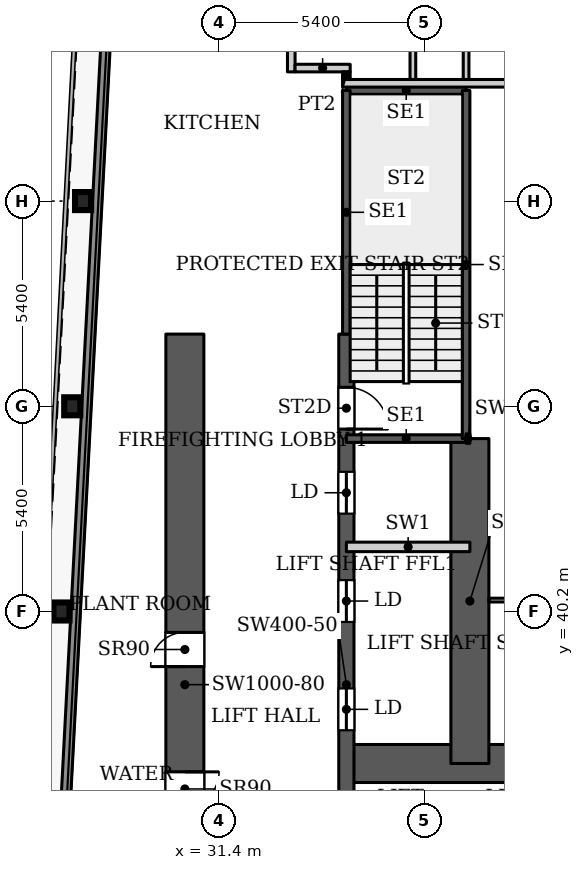
"""IFC4 building model, lengths in metres.
Left out: names, types, materials, properties, quantities, classifications, styles, units other than length and angle.
Written with IfcOpenShell. Run it as: python <this file> out.ifc"""

import sys

from ifc_helpers import new_model, si_unit, direction, frame, frame_2d, origin, origin_2d, place, context, subcontext, project, spatial, rectangle, i_section, extrude, source, transform, mapped, element, fill, save


model = new_model("IFC4")
c1 = context("Model", 3, precision=1e-05, world=origin(), true_north=direction((0.0, 1.0)))
c2 = subcontext(c1, "Body", "Model", "MODEL_VIEW")
j1 = project(units=[si_unit("LENGTHUNIT", "METRE"), si_unit("PLANEANGLEUNIT", "RADIAN")], contexts=[c1])
p1 = place(None, origin())
s1 = spatial("IfcSite", under=j1, at=p1, CompositionType="ELEMENT")
p2 = place(p1, origin())
s2 = spatial("IfcBuilding", under=s1, at=p2, CompositionType="ELEMENT")
p3 = place(p2, frame((0.0, 0.0, 57.8)))
s3 = spatial("IfcBuildingStorey", under=s2, at=p3, CompositionType="ELEMENT", Elevation=57.8)
for number, where, z_axis, x_axis in (
    (1, (27.253, 40.2, 0.0), (0.0, 0.0, 1.0), (1.0, 0.0, 0.0)),
    (2, (27.537, 45.6, 0.0), (0.0, 0.0, 1.0), (1.0, 0.0, 0.0)),
    (3, (27.822, 51.0, 0.0), (0.0, 0.0, 1.0), (1.0, 0.0, 0.0)),
):
    element("IfcColumn", number, at=place(p3, frame(where, z_axis=z_axis, x_axis=x_axis)), inside=s3, PredefinedType="COLUMN", context=c2, shape_type="SweptSolid", body=[
        extrude(i_section(OverallWidth=0.424, OverallDepth=0.474, WebThickness=0.048, FlangeThickness=0.077, FilletRadius=0.014, at=origin_2d()), origin(), (0.0, 0.0, 1.0), 3.9),
    ])
p4 = place(p3, frame((34.75, 36.2, 0.0), z_axis=(0.0, 0.0, 1.0), x_axis=(1.0, 0.0, 0.0)))
e4 = element("IfcWall", 4, at=p4, inside=s3, PredefinedType="SHEAR", context=c2, shape_type="SweptSolid", body=[
    extrude(rectangle(XDim=18.4, YDim=1.0, at=frame_2d((9.2, 0.0))), origin(), (0.0, 0.0, 1.0), 3.9),
])
p5 = place(p4, frame((16.9, 0.0, 0.0)))
e5 = element("IfcOpeningElement", 5, at=p5, cuts=e4, PredefinedType="OPENING", context=c2, shape_type="SweptSolid", body=[
    extrude(rectangle(XDim=1.0, YDim=2.2, at=frame_2d((0.5, 1.1))), frame((0.0, 0.51, 0.0), z_axis=(0.0, -1.0, 0.0), x_axis=(1.0, 0.0, 0.0)), (0.0, 0.0, 1.0), 1.02),
])
p6 = place(p3, frame((34.75, 29.05, 0.0), z_axis=(0.0, 0.0, 1.0), x_axis=(0.0, 1.0, 0.0)))
e6 = element("IfcWall", 6, at=p6, inside=s3, PredefinedType="SHEAR", context=c2, shape_type="SweptSolid", body=[
    extrude(rectangle(XDim=18.45, YDim=0.4, at=frame_2d((9.225, 0.0))), origin(), (0.0, 0.0, 1.0), 3.9),
])
p7 = place(p6, frame((8.025, 0.0, 0.0)))
e7 = element("IfcOpeningElement", 7, at=p7, cuts=e6, PredefinedType="OPENING", context=c2, shape_type="SweptSolid", body=[
    extrude(rectangle(XDim=1.1, YDim=2.2, at=frame_2d((0.55, 1.1))), frame((0.0, 0.21, 0.0), z_axis=(0.0, -1.0, 0.0), x_axis=(1.0, 0.0, 0.0)), (0.0, 0.0, 1.0), 0.42),
])
p8 = place(p6, frame((10.875, 0.0, 0.0)))
e8 = element("IfcOpeningElement", 8, at=p8, cuts=e6, PredefinedType="OPENING", context=c2, shape_type="SweptSolid", body=[
    extrude(rectangle(XDim=1.1, YDim=2.2, at=frame_2d((0.55, 1.1))), frame((0.0, 0.21, 0.0), z_axis=(0.0, -1.0, 0.0), x_axis=(1.0, 0.0, 0.0)), (0.0, 0.0, 1.0), 0.42),
])
p9 = place(p6, frame((13.725, 0.0, 0.0)))
e9 = element("IfcOpeningElement", 9, at=p9, cuts=e6, PredefinedType="OPENING", context=c2, shape_type="SweptSolid", body=[
    extrude(rectangle(XDim=1.1, YDim=2.2, at=frame_2d((0.55, 1.1))), frame((0.0, 0.21, 0.0), z_axis=(0.0, -1.0, 0.0), x_axis=(1.0, 0.0, 0.0)), (0.0, 0.0, 1.0), 0.42),
])
p10 = place(p6, frame((15.95, 0.0, 0.0)))
e10 = element("IfcOpeningElement", 10, at=p10, cuts=e6, PredefinedType="OPENING", context=c2, shape_type="SweptSolid", body=[
    extrude(rectangle(XDim=1.1, YDim=2.2, at=frame_2d((0.55, 1.1))), frame((0.0, 0.21, 0.0), z_axis=(0.0, -1.0, 0.0), x_axis=(1.0, 0.0, 0.0)), (0.0, 0.0, 1.0), 0.42),
])
p11 = place(p3, frame((38.0, 36.2, 0.0), z_axis=(0.0, 0.0, 1.0), x_axis=(0.0, 1.0, 0.0)))
e11 = element("IfcWall", 11, at=p11, inside=s3, PredefinedType="SHEAR", context=c2, shape_type="SweptSolid", body=[
    extrude(rectangle(XDim=8.55, YDim=1.0, at=frame_2d((4.275, 0.0))), origin(), (0.0, 0.0, 1.0), 3.9),
])
p12 = place(p3, frame((30.5, 29.05, 0.0), z_axis=(0.0, 0.0, 1.0), x_axis=(0.0, 1.0, 0.0)))
e12 = element("IfcWall", 12, at=p12, inside=s3, PredefinedType="SHEAR", context=c2, shape_type="SweptSolid", body=[
    extrude(rectangle(XDim=18.45, YDim=1.0, at=frame_2d((9.225, 0.0))), origin(), (0.0, 0.0, 1.0), 3.9),
])
p13 = place(p12, frame((1.5, 0.0, 0.0)))
e13 = element("IfcOpeningElement", 13, at=p13, cuts=e12, PredefinedType="OPENING", context=c2, shape_type="SweptSolid", body=[
    extrude(rectangle(XDim=0.9, YDim=2.2, at=frame_2d((0.45, 1.1))), frame((0.0, 0.51, 0.0), z_axis=(0.0, -1.0, 0.0), x_axis=(1.0, 0.0, 0.0)), (0.0, 0.0, 1.0), 1.02),
])
p14 = place(p12, frame((6.03, 0.0, 0.0)))
e14 = element("IfcOpeningElement", 14, at=p14, cuts=e12, PredefinedType="OPENING", context=c2, shape_type="SweptSolid", body=[
    extrude(rectangle(XDim=0.9, YDim=2.2, at=frame_2d((0.45, 1.1))), frame((0.0, 0.51, 0.0), z_axis=(0.0, -1.0, 0.0), x_axis=(1.0, 0.0, 0.0)), (0.0, 0.0, 1.0), 1.02),
])
p15 = place(p12, frame((9.7, 0.0, 0.0)))
e15 = element("IfcOpeningElement", 15, at=p15, cuts=e12, PredefinedType="OPENING", context=c2, shape_type="SweptSolid", body=[
    extrude(rectangle(XDim=0.9, YDim=2.2, at=frame_2d((0.45, 1.1))), frame((0.0, 0.51, 0.0), z_axis=(0.0, -1.0, 0.0), x_axis=(1.0, 0.0, 0.0)), (0.0, 0.0, 1.0), 1.02),
])
p16 = place(p3, frame((27.195, 31.969, 0.0), z_axis=(0.0, 0.0, 1.0), x_axis=(0.052554995867, 0.998618031286, 0.0)))
e16 = element("IfcWall", 16, at=p16, inside=s3, PredefinedType="SOLIDWALL", context=c2, shape_type="SweptSolid", body=[
    extrude(rectangle(XDim=66.787, YDim=0.25, at=frame_2d((33.394, 0.0))), origin(), (0.0, 0.0, 1.0), 3.75),
])
for number, where, z_axis, x_axis in (
    (17, (34.75, 44.75, 0.0), (0.0, 0.0, 1.0), (1.0, 0.0, 0.0)),
    (18, (34.75, 53.91, 0.0), (0.0, 0.0, 1.0), (1.0, 0.0, 0.0)),
):
    element("IfcWall", number, at=place(p3, frame(where, z_axis=z_axis, x_axis=x_axis)), inside=s3, PredefinedType="SHEAR", context=c2, shape_type="SweptSolid", body=[
        extrude(rectangle(XDim=3.15, YDim=0.2, at=frame_2d((1.575, 0.0))), origin(), (0.0, 0.0, 1.0), 3.9),
    ])
p17 = place(p3, frame((34.75, 47.5, 0.0), z_axis=(0.0, 0.0, 1.0), x_axis=(0.0, 1.0, 0.0)))
e19 = element("IfcWall", 19, at=p17, inside=s3, PredefinedType="SHEAR", context=c2, shape_type="SweptSolid", body=[
    extrude(rectangle(XDim=6.41, YDim=0.2, at=frame_2d((3.205, 0.0))), origin(), (0.0, 0.0, 1.0), 3.9),
])
p18 = place(p3, frame((37.9, 44.75, 0.0), z_axis=(0.0, 0.0, 1.0), x_axis=(0.0, 1.0, 0.0)))
e20 = element("IfcWall", 20, at=p18, inside=s3, PredefinedType="SHEAR", context=c2, shape_type="SweptSolid", body=[
    extrude(rectangle(XDim=9.16, YDim=0.2, at=frame_2d((4.58, 0.0))), origin(), (0.0, 0.0, 1.0), 3.9),
])
p19 = place(p3, frame((34.75, 41.9, 0.0), z_axis=(0.0, 0.0, 1.0), x_axis=(1.0, 0.0, 0.0)))
e21 = element("IfcWall", 21, at=p19, inside=s3, PredefinedType="PARTITIONING", context=c2, shape_type="SweptSolid", body=[
    extrude(rectangle(XDim=3.25, YDim=0.25, at=frame_2d((1.625, 0.0))), origin(), (0.0, 0.0, 1.0), 3.9),
])
p20 = place(p3, frame((37.9, 44.75, 0.0), z_axis=(0.0, 0.0, 1.0), x_axis=(1.0, 0.0, 0.0)))
e22 = element("IfcWall", 22, at=p20, inside=s3, PredefinedType="PARTITIONING", context=c2, shape_type="SweptSolid", body=[
    extrude(rectangle(XDim=0.1, YDim=0.25, at=frame_2d((0.05, 0.0))), origin(), (0.0, 0.0, 1.0), 3.9),
])
p21 = place(p3, frame((33.3, 54.4, 0.0), z_axis=(0.0, 0.0, 1.0), x_axis=(0.0, 1.0, 0.0)))
e23 = element("IfcWall", 23, at=p21, inside=s3, PredefinedType="PARTITIONING", context=c2, shape_type="SweptSolid", body=[
    extrude(rectangle(XDim=24.975, YDim=0.2, at=frame_2d((12.488, 0.0))), origin(), (0.0, 0.0, 1.0), 3.6),
])
p22 = place(p21, frame((10.6, 0.0, 0.0)))
e24 = element("IfcOpeningElement", 24, at=p22, cuts=e23, PredefinedType="OPENING", context=c2, shape_type="SweptSolid", body=[
    extrude(rectangle(XDim=1.0, YDim=2.1, at=frame_2d((0.5, 1.05))), frame((0.0, 0.11, 0.0), z_axis=(0.0, -1.0, 0.0), x_axis=(1.0, 0.0, 0.0)), (0.0, 0.0, 1.0), 0.22),
])
p23 = place(p21, frame((22.0, 0.0, 0.0)))
e25 = element("IfcOpeningElement", 25, at=p23, cuts=e23, PredefinedType="OPENING", context=c2, shape_type="SweptSolid", body=[
    extrude(rectangle(XDim=1.0, YDim=2.1, at=frame_2d((0.5, 1.05))), frame((0.0, 0.11, 0.0), z_axis=(0.0, -1.0, 0.0), x_axis=(1.0, 0.0, 0.0)), (0.0, 0.0, 1.0), 0.22),
])
p24 = place(p3, frame((33.4, 54.5, 0.0), z_axis=(0.0, 0.0, 1.0), x_axis=(1.0, 0.0, 0.0)))
e26 = element("IfcWall", 26, at=p24, inside=s3, PredefinedType="PARTITIONING", context=c2, shape_type="SweptSolid", body=[
    extrude(rectangle(XDim=1.45, YDim=0.2, at=frame_2d((0.725, 0.0))), origin(), (0.0, 0.0, 1.0), 3.6),
])
p25 = place(p3, frame((34.65, 54.1, 0.0), z_axis=(0.0, 0.0, 1.0), x_axis=(1.0, 0.0, 0.0)))
e27 = element("IfcWall", 27, at=p25, inside=s3, PredefinedType="PARTITIONING", context=c2, shape_type="SweptSolid", body=[
    extrude(rectangle(XDim=11.25, YDim=0.2, at=frame_2d((5.625, 0.0))), origin(), (0.0, 0.0, 1.0), 3.6),
])
p26 = place(p3, frame((34.75, 54.2, 0.0), z_axis=(0.0, 0.0, 1.0), x_axis=(0.0, 1.0, 0.0)))
e28 = element("IfcWall", 28, at=p26, inside=s3, PredefinedType="PARTITIONING", context=c2, shape_type="SweptSolid", body=[
    extrude(rectangle(XDim=0.2, YDim=0.2, at=frame_2d((0.1, 0.0))), origin(), (0.0, 0.0, 1.0), 3.6),
])
p27 = place(p3, frame((36.5, 54.2, 0.0), z_axis=(0.0, 0.0, 1.0), x_axis=(0.0, 1.0, 0.0)))
e29 = element("IfcWall", 29, at=p27, inside=s3, PredefinedType="PARTITIONING", context=c2, shape_type="SweptSolid", body=[
    extrude(rectangle(XDim=10.175, YDim=0.15, at=frame_2d((5.087, 0.0))), origin(), (0.0, 0.0, 1.0), 3.6),
])
p28 = place(p27, frame((5.8, 0.0, 0.0)))
e30 = element("IfcOpeningElement", 30, at=p28, cuts=e29, PredefinedType="OPENING", context=c2, shape_type="SweptSolid", body=[
    extrude(rectangle(XDim=0.8, YDim=2.1, at=frame_2d((0.4, 1.05))), frame((0.0, 0.085, 0.0), z_axis=(0.0, -1.0, 0.0), x_axis=(1.0, 0.0, 0.0)), (0.0, 0.0, 1.0), 0.17),
])
p29 = place(p27, frame((1.45, 0.0, 0.0)))
e31 = element("IfcOpeningElement", 31, at=p29, cuts=e29, PredefinedType="OPENING", context=c2, shape_type="SweptSolid", body=[
    extrude(rectangle(XDim=0.9, YDim=2.1, at=frame_2d((0.45, 1.05))), frame((0.0, 0.085, 0.0), z_axis=(0.0, -1.0, 0.0), x_axis=(1.0, 0.0, 0.0)), (0.0, 0.0, 1.0), 0.17),
])
p30 = place(p27, frame((8.5, 0.0, 0.0)))
e32 = element("IfcOpeningElement", 32, at=p30, cuts=e29, PredefinedType="OPENING", context=c2, shape_type="SweptSolid", body=[
    extrude(rectangle(XDim=0.8, YDim=2.1, at=frame_2d((0.4, 1.05))), frame((0.0, 0.085, 0.0), z_axis=(0.0, -1.0, 0.0), x_axis=(1.0, 0.0, 0.0)), (0.0, 0.0, 1.0), 0.17),
])
p31 = place(p3, frame((37.9, 54.2, 0.0), z_axis=(0.0, 0.0, 1.0), x_axis=(0.0, 1.0, 0.0)))
e33 = element("IfcWall", 33, at=p31, inside=s3, PredefinedType="PARTITIONING", context=c2, shape_type="SweptSolid", body=[
    extrude(rectangle(XDim=13.3, YDim=0.15, at=frame_2d((6.65, 0.0))), origin(), (0.0, 0.0, 1.0), 3.6),
])
p32 = place(p31, frame((1.25, 0.0, 0.0)))
e34 = element("IfcOpeningElement", 34, at=p32, cuts=e33, PredefinedType="OPENING", context=c2, shape_type="SweptSolid", body=[
    extrude(rectangle(XDim=0.9, YDim=2.1, at=frame_2d((0.45, 1.05))), frame((0.0, 0.085, 0.0), z_axis=(0.0, -1.0, 0.0), x_axis=(1.0, 0.0, 0.0)), (0.0, 0.0, 1.0), 0.17),
])
p33 = place(p31, frame((10.2, 0.0, 0.0)))
e35 = element("IfcOpeningElement", 35, at=p33, cuts=e33, PredefinedType="OPENING", context=c2, shape_type="SweptSolid", body=[
    extrude(rectangle(XDim=1.0, YDim=2.1, at=frame_2d((0.5, 1.05))), frame((0.0, 0.085, 0.0), z_axis=(0.0, -1.0, 0.0), x_axis=(1.0, 0.0, 0.0)), (0.0, 0.0, 1.0), 0.17),
])
p34 = place(p31, frame((4.25, 0.0, 0.0)))
e36 = element("IfcOpeningElement", 36, at=p34, cuts=e33, PredefinedType="OPENING", context=c2, shape_type="SweptSolid", body=[
    extrude(rectangle(XDim=0.9, YDim=2.1, at=frame_2d((0.45, 1.05))), frame((0.0, 0.085, 0.0), z_axis=(0.0, -1.0, 0.0), x_axis=(1.0, 0.0, 0.0)), (0.0, 0.0, 1.0), 0.17),
])
p35 = place(p3, frame((38.499, 40.5, 0.0), z_axis=(0.0, 0.0, 1.0), x_axis=(1.0, 0.0, 0.0)))
e37 = element("IfcWall", 37, at=p35, inside=s3, PredefinedType="PARTITIONING", context=c2, shape_type="SweptSolid", body=[
    extrude(rectangle(XDim=14.801, YDim=0.1, at=frame_2d((7.4, 0.0))), origin(), (0.0, 0.0, 1.0), 3.6),
])
p36 = place(p35, frame((6.701, 0.0, 0.0)))
e38 = element("IfcOpeningElement", 38, at=p36, cuts=e37, PredefinedType="OPENING", context=c2, shape_type="SweptSolid", body=[
    extrude(rectangle(XDim=1.0, YDim=2.1, at=frame_2d((0.5, 1.05))), frame((0.0, 0.06, 0.0), z_axis=(0.0, -1.0, 0.0), x_axis=(1.0, 0.0, 0.0)), (0.0, 0.0, 1.0), 0.12),
])
m1 = source(origin(), c2, "Body", "SweptSolid", [
    extrude(rectangle(XDim=1.1, YDim=2.2, at=frame_2d((0.55, 1.1))), frame((0.0, 0.025, 0.0), z_axis=(0.0, -1.0, 0.0), x_axis=(1.0, 0.0, 0.0)), (0.0, 0.0, 1.0), 0.05),
])
p37 = place(p7, origin())
e39 = element("IfcDoor", 39, at=p37, inside=s3, OperationType="SLIDING_TO_LEFT", PredefinedType="DOOR", context=c2, shape_type="MappedRepresentation", body=[
    mapped(m1, transform((0.0, 0.0, 0.0), x_axis=(1.0, 0.0, 0.0), y_axis=(0.0, 1.0, 0.0), z_axis=(0.0, 0.0, 1.0), scale=1.0)),
])
fill(e7, e39)
p38 = place(p8, origin())
e40 = element("IfcDoor", 40, at=p38, inside=s3, OperationType="SLIDING_TO_LEFT", PredefinedType="DOOR", context=c2, shape_type="MappedRepresentation", body=[
    mapped(m1, transform((0.0, 0.0, 0.0), x_axis=(1.0, 0.0, 0.0), y_axis=(0.0, 1.0, 0.0), z_axis=(0.0, 0.0, 1.0), scale=1.0)),
])
fill(e8, e40)
p39 = place(p9, origin())
e41 = element("IfcDoor", 41, at=p39, inside=s3, OperationType="SLIDING_TO_LEFT", PredefinedType="DOOR", context=c2, shape_type="MappedRepresentation", body=[
    mapped(m1, transform((0.0, 0.0, 0.0), x_axis=(1.0, 0.0, 0.0), y_axis=(0.0, 1.0, 0.0), z_axis=(0.0, 0.0, 1.0), scale=1.0)),
])
fill(e9, e41)
m2 = source(origin(), c2, "Body", "SweptSolid", [
    extrude(rectangle(XDim=0.9, YDim=2.2, at=frame_2d((0.45, 1.1))), frame((0.0, 0.025, 0.0), z_axis=(0.0, -1.0, 0.0), x_axis=(1.0, 0.0, 0.0)), (0.0, 0.0, 1.0), 0.05),
])
p40 = place(p14, origin())
e42 = element("IfcDoor", 42, at=p40, inside=s3, OperationType="SINGLE_SWING_RIGHT", PredefinedType="DOOR", context=c2, shape_type="MappedRepresentation", body=[
    mapped(m2, transform((0.0, 0.0, 0.0), x_axis=(1.0, 0.0, 0.0), y_axis=(0.0, 1.0, 0.0), z_axis=(0.0, 0.0, 1.0), scale=1.0)),
])
fill(e14, e42)
p41 = place(p15, origin())
e43 = element("IfcDoor", 43, at=p41, inside=s3, OperationType="SINGLE_SWING_LEFT", PredefinedType="DOOR", context=c2, shape_type="MappedRepresentation", body=[
    mapped(m2, transform((0.0, 0.0, 0.0), x_axis=(1.0, 0.0, 0.0), y_axis=(0.0, 1.0, 0.0), z_axis=(0.0, 0.0, 1.0), scale=1.0)),
])
fill(e15, e43)
m3 = source(origin(), c2, "Body", "SweptSolid", [
    extrude(rectangle(XDim=1.1, YDim=2.2, at=frame_2d((0.55, 1.1))), frame((0.0, 0.025, 0.0), z_axis=(0.0, -1.0, 0.0), x_axis=(1.0, 0.0, 0.0)), (0.0, 0.0, 1.0), 0.05),
])
p42 = place(p10, origin())
e44 = element("IfcDoor", 44, at=p42, inside=s3, OperationType="SINGLE_SWING_RIGHT", PredefinedType="DOOR", context=c2, shape_type="MappedRepresentation", body=[
    mapped(m3, transform((0.0, 0.0, 0.0), x_axis=(1.0, 0.0, 0.0), y_axis=(0.0, 1.0, 0.0), z_axis=(0.0, 0.0, 1.0), scale=1.0)),
])
fill(e10, e44)
save(model, sys.argv[1])
